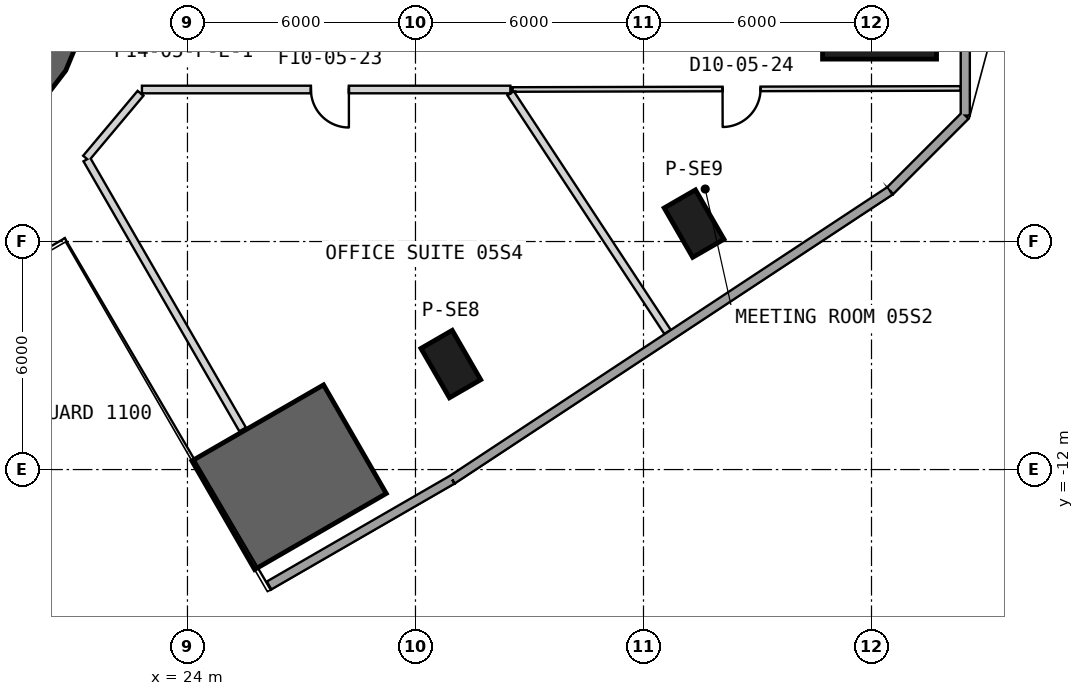
"""IFC4 building model, lengths in metres.
Left out: names, types, materials, properties, quantities, classifications, styles, units other than length and angle.
Written with IfcOpenShell. Run it as: python <this file> out.ifc"""

import sys

from ifc_helpers import new_model, si_unit, direction, frame, frame_2d, origin, origin_2d, place, context, subcontext, project, spatial, polyline, rectangle, outline, extrude, element, fill, save


model = new_model("IFC4")
c1 = context("Model", 3, precision=1e-05, world=origin(), true_north=direction((0.0, 1.0)))
c2 = subcontext(c1, "Body", "Model", "MODEL_VIEW")
j1 = project(units=[si_unit("LENGTHUNIT", "METRE"), si_unit("PLANEANGLEUNIT", "RADIAN")], contexts=[c1])
p1 = place(None, origin())
s1 = spatial("IfcSite", under=j1, at=p1, CompositionType="ELEMENT")
p2 = place(p1, origin())
s2 = spatial("IfcBuilding", under=s1, at=p2, CompositionType="ELEMENT")
p3 = place(p2, frame((0.0, 0.0, 33.5)))
s3 = spatial("IfcBuildingStorey", under=s2, at=p3, CompositionType="ELEMENT", Elevation=33.5)
p4 = place(p3, frame((42.211, 0.0, 0.0), z_axis=(0.0, 0.0, 1.0), x_axis=(1.0, 0.0, 0.0)))
e1 = element("IfcColumn", 1, at=p4, inside=s3, PredefinedType="COLUMN", context=c2, shape_type="SweptSolid", body=[
    extrude(rectangle(XDim=3.0, YDim=2.4, at=origin_2d()), origin(), (0.0, 0.0, 1.0), 6.0),
])
for number, where, z_axis, x_axis in (
    (2, (30.93, -9.224, 0.0), (0.0, 0.0, 1.0), (0.5, -0.866, 0.0)),
    (3, (37.331, -5.528, 0.0), (0.0, 0.0, 1.0), (0.5, -0.866, 0.0)),
):
    element("IfcColumn", number, at=place(p3, frame(where, z_axis=z_axis, x_axis=x_axis)), inside=s3, PredefinedType="COLUMN", context=c2, shape_type="SweptSolid", body=[
        extrude(rectangle(XDim=1.5, YDim=0.95, at=origin_2d()), origin(), (0.0, 0.0, 1.0), 6.0),
    ])
p5 = place(p3, origin())
e4 = element("IfcWall", 4, at=p5, inside=s3, PredefinedType="SHEAR", context=c2, shape_type="SweptSolid", body=[
    extrude(outline(polyline([(19.7, -2.598), (20.321, -2.121), (20.798, -1.5), (21.098, -0.777), (21.2, 0.0), (21.098, 0.777), (20.798, 1.5), (20.321, 2.121), (19.7, 2.598), (19.25, 1.819), (19.685, 1.485), (20.019, 1.05), (20.229, 0.543), (20.3, 0.0), (20.229, -0.543), (20.019, -1.05), (19.685, -1.485), (19.25, -1.819), (19.7, -2.598)])), origin(), (0.0, 0.0, 1.0), 6.0),
])
p6 = place(p3, origin())
e5 = element("IfcWall", 5, at=p6, inside=s3, PredefinedType="SHEAR", context=c2, shape_type="SweptSolid", body=[
    extrude(outline(polyline([(25.767, -14.63), (29.231, -12.63), (27.581, -9.772), (24.117, -11.772), (25.767, -14.63)])), origin(), (0.0, 0.0, 1.0), 6.0),
])
p7 = place(p3, frame((26.147, -15.05, 0.0), z_axis=(0.0, 0.0, 1.0), x_axis=(0.865999312459, 0.500045188778, 0.0)))
e6 = element("IfcWall", 6, at=p7, inside=s3, PredefinedType="SOLIDWALL", context=c2, shape_type="SweptSolid", body=[
    extrude(rectangle(XDim=5.566, YDim=0.24, at=frame_2d((2.783, 0.0))), origin(), (0.0, 0.0, 1.0), 5.65),
])
p8 = place(p3, frame((30.968, -12.267, 0.0), z_axis=(0.0, 0.0, 1.0), x_axis=(0.834683405501, 0.550730072342, 0.0)))
e7 = element("IfcWall", 7, at=p8, inside=s3, PredefinedType="SOLIDWALL", context=c2, shape_type="SweptSolid", body=[
    extrude(rectangle(XDim=13.801, YDim=0.24, at=frame_2d((6.901, 0.0))), origin(), (0.0, 0.0, 1.0), 5.65),
])
p9 = place(p3, frame((42.487, -4.666, 0.0), z_axis=(0.0, 0.0, 1.0), x_axis=(0.707106781187, 0.707106781187, 0.0)))
e8 = element("IfcWall", 8, at=p9, inside=s3, PredefinedType="SOLIDWALL", context=c2, shape_type="SweptSolid", body=[
    extrude(rectangle(XDim=2.801, YDim=0.24, at=frame_2d((1.4, 0.0))), origin(), (0.0, 0.0, 1.0), 5.65),
])
p10 = place(p3, frame((44.468, -2.686, 0.0), z_axis=(0.0, 0.0, 1.0), x_axis=(0.0, 1.0, 0.0)))
e9 = element("IfcWall", 9, at=p10, inside=s3, PredefinedType="SOLIDWALL", context=c2, shape_type="SweptSolid", body=[
    extrude(rectangle(XDim=5.371, YDim=0.24, at=frame_2d((2.686, 0.0))), origin(), (0.0, 0.0, 1.0), 5.65),
])
p11 = place(p3, frame((32.497, -2.0, 0.0), z_axis=(0.0, 0.0, 1.0), x_axis=(-1.0, 0.0, 0.0)))
e10 = element("IfcWall", 10, at=p11, inside=s3, PredefinedType="PARTITIONING", context=c2, shape_type="SweptSolid", body=[
    extrude(rectangle(XDim=9.695, YDim=0.2, at=frame_2d((4.847, 0.0))), origin(), (0.0, 0.0, 1.0), 5.65),
])
p12 = place(p11, frame((4.249, 0.0, 0.0)))
e11 = element("IfcOpeningElement", 11, at=p12, cuts=e10, PredefinedType="OPENING", context=c2, shape_type="SweptSolid", body=[
    extrude(rectangle(XDim=1.0, YDim=2.1, at=frame_2d((0.5, 1.05))), frame((0.0, 0.11, 0.0), z_axis=(0.0, -1.0, 0.0), x_axis=(1.0, 0.0, 0.0)), (0.0, 0.0, 1.0), 0.22),
])
p13 = place(p3, frame((21.332, -3.807, 0.0), z_axis=(0.0, 0.0, 1.0), x_axis=(0.642927476008, 0.765927059578, 0.0)))
e12 = element("IfcWall", 12, at=p13, inside=s3, PredefinedType="PARTITIONING", context=c2, shape_type="SweptSolid", body=[
    extrude(rectangle(XDim=2.229, YDim=0.2, at=frame_2d((1.115, 0.0))), origin(), (0.0, 0.0, 1.0), 4.73),
])
p14 = place(p3, frame((25.452, -10.944, 0.0), z_axis=(0.0, 0.0, 1.0), x_axis=(-0.499992958048, 0.866029469419, 0.0)))
e13 = element("IfcWall", 13, at=p14, inside=s3, PredefinedType="PARTITIONING", context=c2, shape_type="SweptSolid", body=[
    extrude(rectangle(XDim=8.203, YDim=0.2, at=frame_2d((4.102, 0.0))), origin(), (0.0, 0.0, 1.0), 4.83),
])
p15 = place(p3, frame((44.347, -1.971, 0.0), z_axis=(0.0, 0.0, 1.0), x_axis=(-0.9999971152, -0.002401997502, 0.0)))
e14 = element("IfcWall", 14, at=p15, inside=s3, PredefinedType="PARTITIONING", context=c2, shape_type="SweptSolid", body=[
    extrude(rectangle(XDim=11.79, YDim=0.12, at=frame_2d((5.895, 0.0))), origin(), (0.0, 0.0, 1.0), 5.65),
])
p16 = place(p15, frame((5.267, 0.0, 0.0)))
e15 = element("IfcOpeningElement", 15, at=p16, cuts=e14, PredefinedType="OPENING", context=c2, shape_type="SweptSolid", body=[
    extrude(rectangle(XDim=1.0, YDim=2.1, at=frame_2d((0.5, 1.05))), frame((0.0, 0.07, 0.0), z_axis=(0.0, -1.0, 0.0), x_axis=(1.0, 0.0, 0.0)), (0.0, 0.0, 1.0), 0.14),
])
p17 = place(p3, frame((36.634, -8.378, 0.0), z_axis=(0.0, 0.0, 1.0), x_axis=(-0.549584280898, 0.835438279102, 0.0)))
e16 = element("IfcWall", 16, at=p17, inside=s3, PredefinedType="PARTITIONING", context=c2, shape_type="SweptSolid", body=[
    extrude(rectangle(XDim=7.515, YDim=0.2, at=frame_2d((3.757, 0.0))), origin(), (0.0, 0.0, 1.0), 4.73),
])
p18 = place(p12, origin())
e17 = element("IfcDoor", 17, at=p18, inside=s3, OperationType="SINGLE_SWING_LEFT", PredefinedType="USERDEFINED", context=c2, shape_type="SweptSolid", body=[
    extrude(rectangle(XDim=1.0, YDim=2.1, at=frame_2d((0.5, 1.05))), frame((0.0, 0.025, 0.0), z_axis=(0.0, -1.0, 0.0), x_axis=(1.0, 0.0, 0.0)), (0.0, 0.0, 1.0), 0.05),
])
fill(e11, e17)
p19 = place(p16, origin())
e18 = element("IfcDoor", 18, at=p19, inside=s3, OperationType="SINGLE_SWING_RIGHT", PredefinedType="NOTDEFINED", context=c2, shape_type="SweptSolid", body=[
    extrude(rectangle(XDim=1.0, YDim=2.1, at=frame_2d((0.5, 1.05))), frame((0.0, 0.025, 0.0), z_axis=(0.0, -1.0, 0.0), x_axis=(1.0, 0.0, 0.0)), (0.0, 0.0, 1.0), 0.05),
])
fill(e15, e18)
save(model, sys.argv[1])
